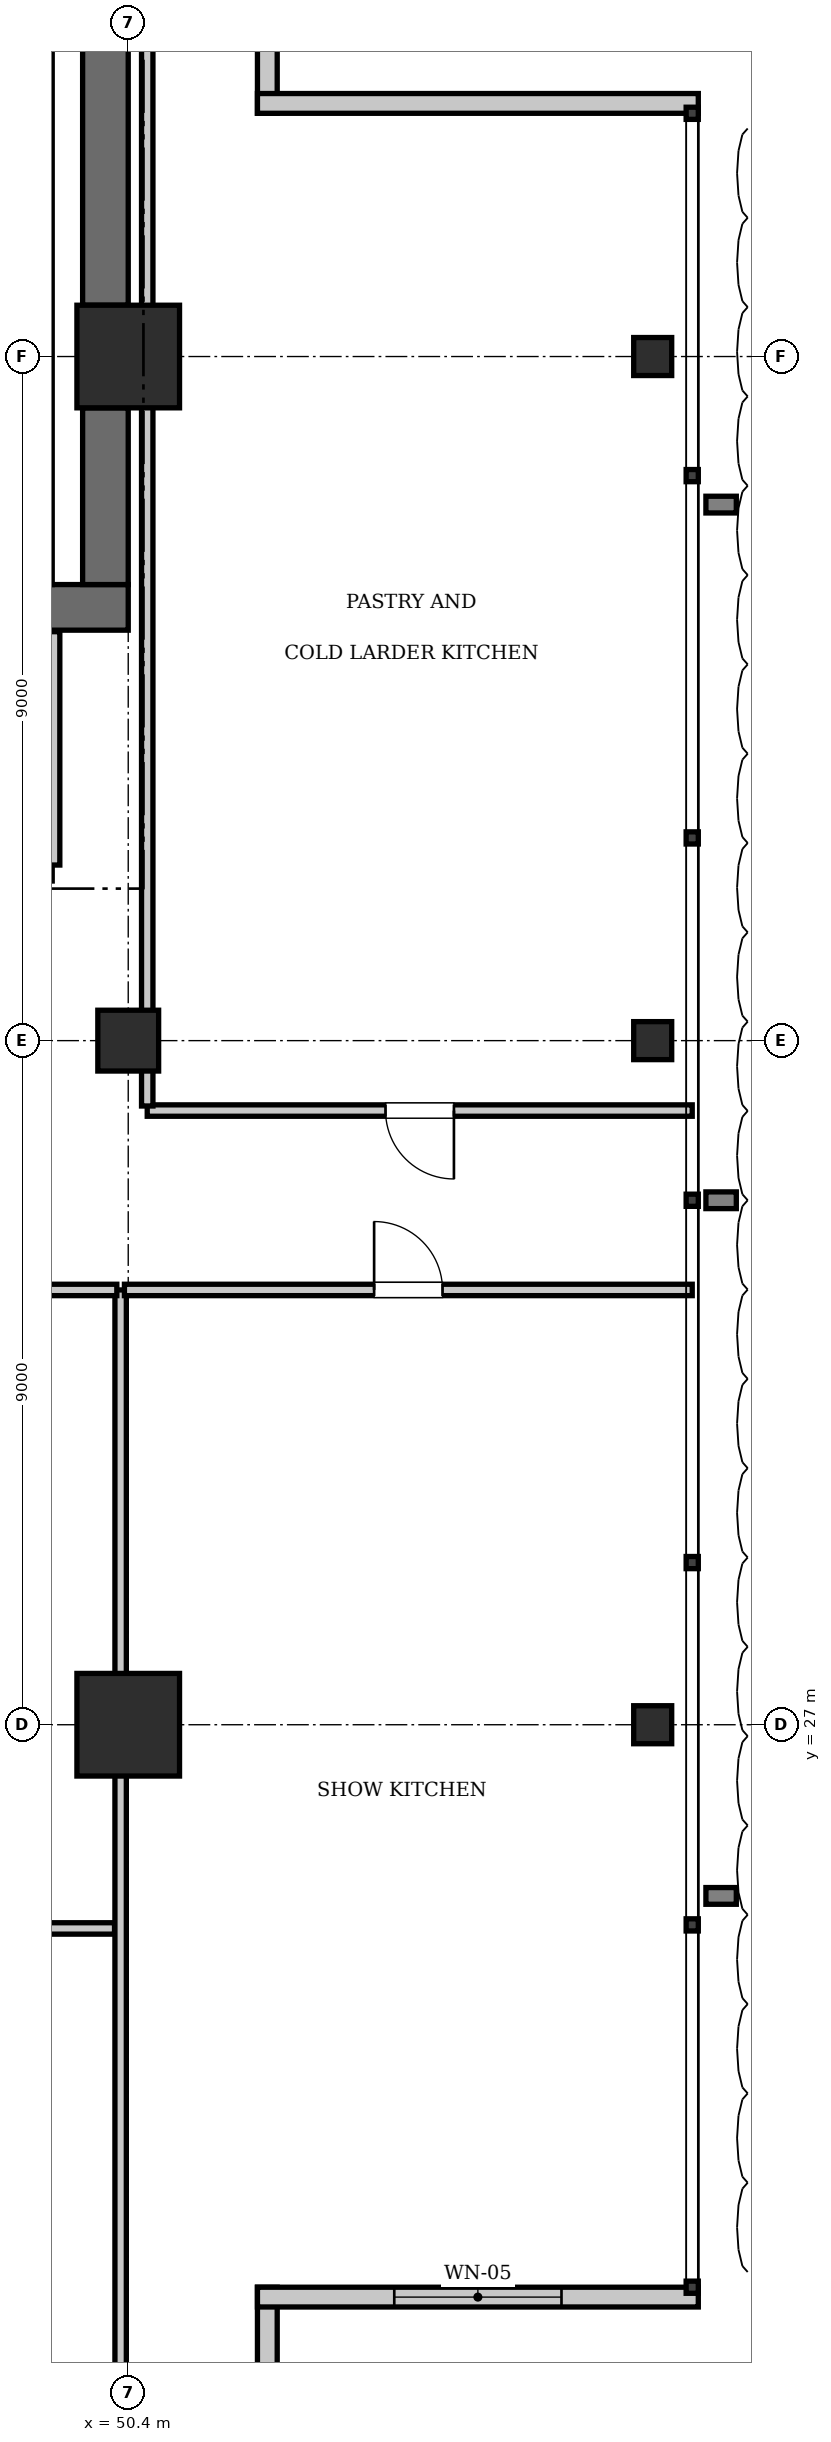
"""IFC4 building model, lengths in metres.
Left out: names, types, materials, properties, quantities, classifications, styles, units other than length and angle.
Written with IfcOpenShell. Run it as: python <this file> out.ifc"""

import sys

from ifc_helpers import new_model, si_unit, direction, frame, frame_2d, origin, origin_2d, place, context, subcontext, project, spatial, rectangle, i_section, extrude, element, fill, save


model = new_model("IFC4")
c1 = context("Model", 3, precision=1e-05, world=origin(), true_north=direction((0.0, 1.0)))
c2 = subcontext(c1, "Body", "Model", "MODEL_VIEW")
j1 = project(units=[si_unit("LENGTHUNIT", "METRE"), si_unit("PLANEANGLEUNIT", "RADIAN")], contexts=[c1])
p1 = place(None, origin())
s1 = spatial("IfcSite", under=j1, at=p1, CompositionType="ELEMENT")
p2 = place(p1, origin())
s2 = spatial("IfcBuilding", under=s1, at=p2, CompositionType="ELEMENT")
p3 = place(p2, frame((0.0, 0.0, 345.1)))
s3 = spatial("IfcBuildingStorey", under=s2, at=p3, CompositionType="ELEMENT", Elevation=345.1)
for number, where, z_axis, x_axis in (
    (1, (50.4, 27.0, 0.0), (0.0, 0.0, 1.0), (1.0, 0.0, 0.0)),
    (2, (50.4, 45.0, 0.0), (0.0, 0.0, 1.0), (1.0, 0.0, 0.0)),
):
    element("IfcColumn", number, at=place(p3, frame(where, z_axis=z_axis, x_axis=x_axis)), inside=s3, PredefinedType="COLUMN", context=c2, shape_type="SweptSolid", body=[
        extrude(rectangle(XDim=1.35, YDim=1.35, at=origin_2d()), origin(), (0.0, 0.0, 1.0), 4.55),
    ])
p4 = place(p3, frame((43.6, 41.7, 0.0), z_axis=(0.0, 0.0, 1.0), x_axis=(1.0, 0.0, 0.0)))
e3 = element("IfcWall", 3, at=p4, inside=s3, PredefinedType="SHEAR", context=c2, shape_type="SweptSolid", body=[
    extrude(rectangle(XDim=6.8, YDim=0.6, at=frame_2d((3.4, 0.0))), origin(), (0.0, 0.0, 1.0), 4.55),
])
p5 = place(p4, frame((3.9, 0.0, 0.0)))
e4 = element("IfcOpeningElement", 4, at=p5, cuts=e3, PredefinedType="OPENING", context=c2, shape_type="SweptSolid", body=[
    extrude(rectangle(XDim=1.15, YDim=2.15, at=frame_2d((0.575, 1.075))), frame((0.0, 0.31, 0.0), z_axis=(0.0, -1.0, 0.0), x_axis=(1.0, 0.0, 0.0)), (0.0, 0.0, 1.0), 0.62),
])
p6 = place(p4, frame((0.55, 0.0, 0.0)))
e5 = element("IfcOpeningElement", 5, at=p6, cuts=e3, PredefinedType="OPENING", context=c2, shape_type="SweptSolid", body=[
    extrude(rectangle(XDim=1.1, YDim=2.2, at=frame_2d((0.55, 1.1))), frame((0.0, 0.31, 0.0), z_axis=(0.0, -1.0, 0.0), x_axis=(1.0, 0.0, 0.0)), (0.0, 0.0, 1.0), 0.62),
])
p7 = place(p3, frame((50.1, 42.0, 0.0), z_axis=(0.0, 0.0, 1.0), x_axis=(0.0, 1.0, 0.0)))
e6 = element("IfcWall", 6, at=p7, inside=s3, PredefinedType="SHEAR", context=c2, shape_type="SweptSolid", body=[
    extrude(rectangle(XDim=2.325, YDim=0.6, at=frame_2d((1.163, 0.0))), origin(), (0.0, 0.0, 1.0), 4.55),
])
p8 = place(p3, frame((50.1, 45.675, 0.0), z_axis=(0.0, 0.0, 1.0), x_axis=(0.0, 1.0, 0.0)))
e7 = element("IfcWall", 7, at=p8, inside=s3, PredefinedType="SHEAR", context=c2, shape_type="SweptSolid", body=[
    extrude(rectangle(XDim=7.725, YDim=0.6, at=frame_2d((3.862, 0.0))), origin(), (0.0, 0.0, 1.0), 4.55),
])
p9 = place(p3, frame((50.4, 36.0, 0.0), z_axis=(0.0, 0.0, 1.0), x_axis=(1.0, 0.0, 0.0)))
e8 = element("IfcColumn", 8, at=p9, inside=s3, PredefinedType="COLUMN", context=c2, shape_type="SweptSolid", body=[
    extrude(rectangle(XDim=0.8, YDim=0.8, at=origin_2d()), origin(), (0.0, 0.0, 1.0), 4.55),
])
for number, where, z_axis, x_axis in (
    (9, (57.3, 27.0, 0.0), (0.0, 0.0, 1.0), (1.0, 0.0, 0.0)),
    (10, (57.3, 36.0, 0.0), (0.0, 0.0, 1.0), (1.0, 0.0, 0.0)),
    (11, (57.3, 45.0, 0.0), (0.0, 0.0, 1.0), (1.0, 0.0, 0.0)),
):
    element("IfcColumn", number, at=place(p3, frame(where, z_axis=z_axis, x_axis=x_axis)), inside=s3, PredefinedType="COLUMN", context=c2, shape_type="SweptSolid", body=[
        extrude(i_section(OverallWidth=0.5, OverallDepth=0.5, WebThickness=0.022, FlangeThickness=0.032, at=origin_2d()), origin(), (0.0, 0.0, 1.0), 4.55),
    ])
p10 = place(p3, frame((49.3, 42.0, 0.0), z_axis=(0.0, 0.0, 1.0), x_axis=(0.0, 1.0, 0.0)))
e12 = element("IfcWall", 12, at=p10, inside=s3, PredefinedType="SOLIDWALL", context=c2, shape_type="SweptSolid", body=[
    extrude(rectangle(XDim=9.12, YDim=0.2, at=frame_2d((4.56, 0.0))), origin(), (0.0, 0.0, 1.0), 4.31),
])
p11 = place(p3, frame((52.23, 19.6, 0.0), z_axis=(0.0, 0.0, 1.0), x_axis=(0.0, -1.0, 0.0)))
e13 = element("IfcWall", 13, at=p11, inside=s3, PredefinedType="SOLIDWALL", context=c2, shape_type="SweptSolid", body=[
    extrude(rectangle(XDim=5.8, YDim=0.26, at=frame_2d((2.9, 0.0))), origin(), (0.0, 0.0, 1.0), 4.31),
])
p12 = place(p3, frame((57.9, 19.47, 0.0), z_axis=(0.0, 0.0, 1.0), x_axis=(-1.0, 0.0, 0.0)))
e14 = element("IfcWall", 14, at=p12, inside=s3, PredefinedType="SOLIDWALL", context=c2, shape_type="SweptSolid", body=[
    extrude(rectangle(XDim=5.8, YDim=0.26, at=frame_2d((2.9, 0.0))), origin(), (0.0, 0.0, 1.0), 4.31),
])
p13 = place(p12, frame((1.8, 0.0, 0.9)))
e15 = element("IfcOpeningElement", 15, at=p13, cuts=e14, PredefinedType="OPENING", context=c2, shape_type="SweptSolid", body=[
    extrude(rectangle(XDim=2.2, YDim=2.8, at=frame_2d((1.1, 1.4))), frame((0.0, 0.14, 0.0), z_axis=(0.0, -1.0, 0.0), x_axis=(1.0, 0.0, 0.0)), (0.0, 0.0, 1.0), 0.28),
])
p14 = place(p3, frame((52.23, 54.0, 0.0), z_axis=(0.0, 0.0, 1.0), x_axis=(0.0, -1.0, 0.0)))
e16 = element("IfcWall", 16, at=p14, inside=s3, PredefinedType="SOLIDWALL", context=c2, shape_type="SweptSolid", body=[
    extrude(rectangle(XDim=5.8, YDim=0.26, at=frame_2d((2.9, 0.0))), origin(), (0.0, 0.0, 1.0), 4.31),
])
p15 = place(p3, frame((52.1, 48.33, 0.0), z_axis=(0.0, 0.0, 1.0), x_axis=(1.0, 0.0, 0.0)))
e17 = element("IfcWall", 17, at=p15, inside=s3, PredefinedType="SOLIDWALL", context=c2, shape_type="SweptSolid", body=[
    extrude(rectangle(XDim=5.8, YDim=0.26, at=frame_2d((2.9, 0.0))), origin(), (0.0, 0.0, 1.0), 4.31),
])
p16 = place(p3, frame((49.4, 38.31, 0.0), z_axis=(0.0, 0.0, 1.0), x_axis=(0.0, 1.0, 0.0)))
e18 = element("IfcWall", 18, at=p16, inside=s3, PredefinedType="PARTITIONING", context=c2, shape_type="SweptSolid", body=[
    extrude(rectangle(XDim=3.07, YDim=0.2, at=frame_2d((1.535, 0.0))), origin(), (0.0, 0.0, 1.0), 4.31),
])
p17 = place(p3, frame((25.38, 24.32, 0.0), z_axis=(0.0, 0.0, 1.0), x_axis=(1.0, 0.0, 0.0)))
e19 = element("IfcWall", 19, at=p17, inside=s3, PredefinedType="PARTITIONING", context=c2, shape_type="SweptSolid", body=[
    extrude(rectangle(XDim=24.84, YDim=0.15, at=frame_2d((12.42, 0.0))), origin(), (0.0, 0.0, 1.0), 4.31),
])
p18 = place(p17, frame((18.0, 0.0, 0.0)))
e20 = element("IfcOpeningElement", 20, at=p18, cuts=e19, PredefinedType="OPENING", context=c2, shape_type="SweptSolid", body=[
    extrude(rectangle(XDim=1.4, YDim=2.2, at=frame_2d((0.7, 1.1))), frame((0.0, 0.085, 0.0), z_axis=(0.0, -1.0, 0.0), x_axis=(1.0, 0.0, 0.0)), (0.0, 0.0, 1.0), 0.17),
])
p19 = place(p3, frame((50.3, 13.88, 0.0), z_axis=(0.0, 0.0, 1.0), x_axis=(0.0, 1.0, 0.0)))
e21 = element("IfcWall", 21, at=p19, inside=s3, PredefinedType="PARTITIONING", context=c2, shape_type="SweptSolid", body=[
    extrude(rectangle(XDim=18.84, YDim=0.15, at=frame_2d((9.42, 0.0))), origin(), (0.0, 0.0, 1.0), 3.841),
])
p20 = place(p3, frame((40.98, 32.72, 0.0), z_axis=(0.0, 0.0, 1.0), x_axis=(1.0, 0.0, 0.0)))
e22 = element("IfcWall", 22, at=p20, inside=s3, PredefinedType="PARTITIONING", context=c2, shape_type="SweptSolid", body=[
    extrude(rectangle(XDim=9.27, YDim=0.15, at=frame_2d((4.635, 0.0))), origin(), (0.0, 0.0, 1.0), 4.31),
])
p21 = place(p20, frame((3.935, 0.0, 0.0)))
e23 = element("IfcOpeningElement", 23, at=p21, cuts=e22, PredefinedType="OPENING", context=c2, shape_type="SweptSolid", body=[
    extrude(rectangle(XDim=1.4, YDim=2.2, at=frame_2d((0.7, 1.1))), frame((0.0, 0.085, 0.0), z_axis=(0.0, -1.0, 0.0), x_axis=(1.0, 0.0, 0.0)), (0.0, 0.0, 1.0), 0.17),
])
p22 = place(p3, frame((50.35, 32.72, 0.0), z_axis=(0.0, 0.0, 1.0), x_axis=(1.0, 0.0, 0.0)))
e24 = element("IfcWall", 24, at=p22, inside=s3, PredefinedType="PARTITIONING", context=c2, shape_type="SweptSolid", body=[
    extrude(rectangle(XDim=7.47, YDim=0.15, at=frame_2d((3.735, 0.0))), origin(), (0.0, 0.0, 1.0), 4.31),
])
p23 = place(p22, frame((3.285, 0.0, 0.0)))
e25 = element("IfcOpeningElement", 25, at=p23, cuts=e24, PredefinedType="OPENING", context=c2, shape_type="SweptSolid", body=[
    extrude(rectangle(XDim=0.9, YDim=2.1, at=frame_2d((0.45, 1.05))), frame((0.0, 0.085, 0.0), z_axis=(0.0, -1.0, 0.0), x_axis=(1.0, 0.0, 0.0)), (0.0, 0.0, 1.0), 0.17),
])
p24 = place(p3, frame((50.65, 35.08, 0.0), z_axis=(0.0, 0.0, 1.0), x_axis=(1.0, 0.0, 0.0)))
e26 = element("IfcWall", 26, at=p24, inside=s3, PredefinedType="PARTITIONING", context=c2, shape_type="SweptSolid", body=[
    extrude(rectangle(XDim=7.17, YDim=0.15, at=frame_2d((3.585, 0.0))), origin(), (0.0, 0.0, 1.0), 4.31),
])
p25 = place(p24, frame((3.135, 0.0, 0.0)))
e27 = element("IfcOpeningElement", 27, at=p25, cuts=e26, PredefinedType="OPENING", context=c2, shape_type="SweptSolid", body=[
    extrude(rectangle(XDim=0.9, YDim=2.1, at=frame_2d((0.45, 1.05))), frame((0.0, 0.085, 0.0), z_axis=(0.0, -1.0, 0.0), x_axis=(1.0, 0.0, 0.0)), (0.0, 0.0, 1.0), 0.17),
])
p26 = place(p3, frame((50.65, 35.14, 0.0), z_axis=(0.0, 0.0, 1.0), x_axis=(0.0, 1.0, 0.0)))
e28 = element("IfcWall", 28, at=p26, inside=s3, PredefinedType="PARTITIONING", context=c2, shape_type="SweptSolid", body=[
    extrude(rectangle(XDim=18.78, YDim=0.15, at=frame_2d((9.39, 0.0))), origin(), (0.0, 0.0, 1.0), 4.31),
])
p27 = place(p13, origin())
e29 = element("IfcWindow", 29, at=p27, inside=s3, PartitioningType="SINGLE_PANEL", PredefinedType="WINDOW", context=c2, shape_type="SweptSolid", body=[
    extrude(rectangle(XDim=2.2, YDim=2.8, at=frame_2d((1.1, 1.4))), frame((0.0, 0.03, 0.0), z_axis=(0.0, -1.0, 0.0), x_axis=(1.0, 0.0, 0.0)), (0.0, 0.0, 1.0), 0.06),
])
fill(e15, e29)
p28 = place(p23, origin())
e30 = element("IfcDoor", 30, at=p28, inside=s3, OperationType="SINGLE_SWING_LEFT", PredefinedType="DOOR", context=c2, shape_type="SweptSolid", body=[
    extrude(rectangle(XDim=0.9, YDim=2.1, at=frame_2d((0.45, 1.05))), frame((0.0, 0.025, 0.0), z_axis=(0.0, -1.0, 0.0), x_axis=(1.0, 0.0, 0.0)), (0.0, 0.0, 1.0), 0.05),
])
fill(e25, e30)
p29 = place(p25, frame((0.9, 0.0, 0.0), z_axis=(0.0, 0.0, 1.0), x_axis=(-1.0, 0.0, 0.0)))
e31 = element("IfcDoor", 31, at=p29, inside=s3, OperationType="SINGLE_SWING_LEFT", PredefinedType="DOOR", context=c2, shape_type="SweptSolid", body=[
    extrude(rectangle(XDim=0.9, YDim=2.1, at=frame_2d((0.45, 1.05))), frame((0.0, 0.025, 0.0), z_axis=(0.0, -1.0, 0.0), x_axis=(1.0, 0.0, 0.0)), (0.0, 0.0, 1.0), 0.05),
])
fill(e27, e31)
save(model, sys.argv[1])
